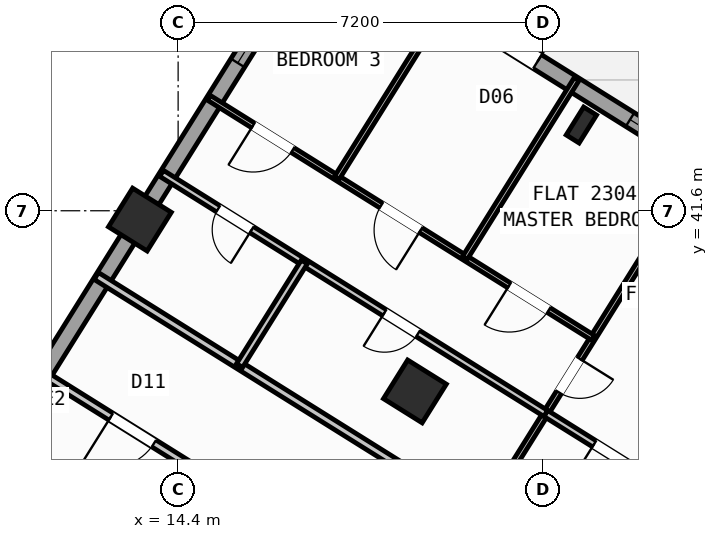
"""IFC4 building model, lengths in metres.
Left out: names, types, materials, properties, quantities, classifications, styles, units other than length and angle.
Written with IfcOpenShell. Run it as: python <this file> out.ifc"""

import sys

from ifc_helpers import new_model, si_unit, direction, frame, frame_2d, origin, origin_2d, place, context, subcontext, project, spatial, rectangle, hollow_rectangle, i_section, extrude, source, transform, mapped, element, fill, save


model = new_model("IFC4")
c1 = context("Model", 3, precision=1e-05, world=origin(), true_north=direction((0.0, 1.0)))
c2 = subcontext(c1, "Body", "Model", "MODEL_VIEW")
j1 = project(units=[si_unit("LENGTHUNIT", "METRE"), si_unit("PLANEANGLEUNIT", "RADIAN")], contexts=[c1])
p1 = place(None, origin())
s1 = spatial("IfcSite", under=j1, at=p1, CompositionType="ELEMENT")
p2 = place(p1, origin())
s2 = spatial("IfcBuilding", under=s1, at=p2, CompositionType="ELEMENT")
p3 = place(p2, frame((0.0, 0.0, 93.6)))
s3 = spatial("IfcBuildingStorey", under=s2, at=p3, CompositionType="ELEMENT", Elevation=93.6)
m1 = source(origin(), c2, "Body", "SweptSolid", [
    extrude(i_section(OverallWidth=0.3, OverallDepth=0.65, WebThickness=0.016, FlangeThickness=0.031, at=origin_2d()), origin(), (0.0, 0.0, 1.0), 3.6),
])
p4 = place(p3, frame((22.358, 43.292, 0.0), z_axis=(0.0, 0.0, 1.0), x_axis=(-0.848048096156, 0.529919264233, 0.0)))
e1 = element("IfcColumn", 1, at=p4, inside=s3, PredefinedType="COLUMN", context=c2, shape_type="MappedRepresentation", body=[
    mapped(m1, transform((0.0, 0.0, 0.0), scale=1.0)),
])
m2 = source(origin(), c2, "Body", "SweptSolid", [
    extrude(hollow_rectangle(XDim=0.9, YDim=0.9, WallThickness=0.036, at=origin_2d()), origin(), (0.0, 0.0, 1.0), 3.6),
])
for number, where, z_axis, x_axis in (
    (2, (19.073, 38.034, 0.0), (0.0, 0.0, 1.0), (-0.848, 0.53, 0.0)),
    (3, (13.646, 41.426, 0.0), (0.0, 0.0, 1.0), (-0.848, 0.53, 0.0)),
):
    element("IfcColumn", number, at=place(p3, frame(where, z_axis=z_axis, x_axis=x_axis)), inside=s3, PredefinedType="COLUMN", context=c2, shape_type="MappedRepresentation", body=[
        mapped(m2, transform((0.0, 0.0, 0.0), scale=1.0)),
    ])
p5 = place(p3, frame((5.7, 28.71, 0.0), z_axis=(0.0, 0.0, 1.0), x_axis=(0.529923711467, 0.8480453172, 0.0)))
e4 = element("IfcWall", 4, at=p5, inside=s3, PredefinedType="STANDARD", context=c2, shape_type="SweptSolid", body=[
    extrude(rectangle(XDim=21.587, YDim=0.32, at=frame_2d((10.794, 0.0))), origin(), (0.0, 0.0, 1.0), 2.775),
])
p6 = place(p5, frame((2.994, 0.0, 0.8)))
e5 = element("IfcOpeningElement", 5, at=p6, cuts=e4, PredefinedType="OPENING", context=c2, shape_type="SweptSolid", body=[
    extrude(rectangle(XDim=2.1, YDim=1.55, at=frame_2d((1.05, 0.775))), frame((0.0, 0.17, 0.0), z_axis=(0.0, -1.0, 0.0), x_axis=(1.0, 0.0, 0.0)), (0.0, 0.0, 1.0), 0.34),
])
p7 = place(p5, frame((9.739, 0.0, 1.0)))
e6 = element("IfcOpeningElement", 6, at=p7, cuts=e4, PredefinedType="OPENING", context=c2, shape_type="SweptSolid", body=[
    extrude(rectangle(XDim=0.9, YDim=1.25, at=frame_2d((0.45, 0.625))), frame((0.0, 0.17, 0.0), z_axis=(0.0, -1.0, 0.0), x_axis=(1.0, 0.0, 0.0)), (0.0, 0.0, 1.0), 0.34),
])
p8 = place(p5, frame((18.639, 0.0, 0.85)))
e7 = element("IfcOpeningElement", 7, at=p8, cuts=e4, PredefinedType="OPENING", context=c2, shape_type="SweptSolid", body=[
    extrude(rectangle(XDim=1.5, YDim=1.5, at=frame_2d((0.75, 0.75))), frame((0.0, 0.17, 0.0), z_axis=(0.0, -1.0, 0.0), x_axis=(1.0, 0.0, 0.0)), (0.0, 0.0, 1.0), 0.34),
])
p9 = place(p3, frame((17.424, 47.083, 0.0), z_axis=(0.0, 0.0, 1.0), x_axis=(0.848049927979, -0.529916332693, 0.0)))
e8 = element("IfcWall", 8, at=p9, inside=s3, PredefinedType="STANDARD", context=c2, shape_type="SweptSolid", body=[
    extrude(rectangle(XDim=29.223, YDim=0.32, at=frame_2d((14.612, 0.0))), origin(), (0.0, 0.0, 1.0), 3.35),
])
p10 = place(p9, frame((3.745, 0.0, 0.0)))
e9 = element("IfcOpeningElement", 9, at=p10, cuts=e8, PredefinedType="OPENING", context=c2, shape_type="SweptSolid", body=[
    extrude(rectangle(XDim=1.05, YDim=2.15, at=frame_2d((0.525, 1.075))), frame((0.0, 0.17, 0.0), z_axis=(0.0, -1.0, 0.0), x_axis=(1.0, 0.0, 0.0)), (0.0, 0.0, 1.0), 0.34),
])
p11 = place(p9, frame((0.699, 0.0, 0.95)))
e10 = element("IfcOpeningElement", 10, at=p11, cuts=e8, PredefinedType="OPENING", context=c2, shape_type="SweptSolid", body=[
    extrude(rectangle(XDim=1.2, YDim=1.4, at=frame_2d((0.6, 0.7))), frame((0.0, 0.17, 0.0), z_axis=(0.0, -1.0, 0.0), x_axis=(1.0, 0.0, 0.0)), (0.0, 0.0, 1.0), 0.34),
])
p12 = place(p9, frame((6.951, 0.0, 1.0)))
e11 = element("IfcOpeningElement", 11, at=p12, cuts=e8, PredefinedType="OPENING", context=c2, shape_type="SweptSolid", body=[
    extrude(rectangle(XDim=0.9, YDim=1.25, at=frame_2d((0.45, 0.625))), frame((0.0, 0.17, 0.0), z_axis=(0.0, -1.0, 0.0), x_axis=(1.0, 0.0, 0.0)), (0.0, 0.0, 1.0), 0.34),
])
p13 = place(p9, frame((9.841, 0.0, 0.85)))
e12 = element("IfcOpeningElement", 12, at=p13, cuts=e8, PredefinedType="OPENING", context=c2, shape_type="SweptSolid", body=[
    extrude(rectangle(XDim=1.5, YDim=1.5, at=frame_2d((0.75, 0.75))), frame((0.0, 0.17, 0.0), z_axis=(0.0, -1.0, 0.0), x_axis=(1.0, 0.0, 0.0)), (0.0, 0.0, 1.0), 0.34),
])
p14 = place(p9, frame((13.889, 0.0, 0.95)))
e13 = element("IfcOpeningElement", 13, at=p14, cuts=e8, PredefinedType="OPENING", context=c2, shape_type="SweptSolid", body=[
    extrude(rectangle(XDim=1.2, YDim=1.4, at=frame_2d((0.6, 0.7))), frame((0.0, 0.17, 0.0), z_axis=(0.0, -1.0, 0.0), x_axis=(1.0, 0.0, 0.0)), (0.0, 0.0, 1.0), 0.34),
])
p15 = place(p9, frame((17.254, 0.0, 1.0)))
e14 = element("IfcOpeningElement", 14, at=p15, cuts=e8, PredefinedType="OPENING", context=c2, shape_type="SweptSolid", body=[
    extrude(rectangle(XDim=0.9, YDim=1.25, at=frame_2d((0.45, 0.625))), frame((0.0, 0.17, 0.0), z_axis=(0.0, -1.0, 0.0), x_axis=(1.0, 0.0, 0.0)), (0.0, 0.0, 1.0), 0.34),
])
p16 = place(p9, frame((20.764, 0.0, 0.8)))
e15 = element("IfcOpeningElement", 15, at=p16, cuts=e8, PredefinedType="OPENING", context=c2, shape_type="SweptSolid", body=[
    extrude(rectangle(XDim=2.1, YDim=1.55, at=frame_2d((1.05, 0.775))), frame((0.0, 0.17, 0.0), z_axis=(0.0, -1.0, 0.0), x_axis=(1.0, 0.0, 0.0)), (0.0, 0.0, 1.0), 0.34),
])
p17 = place(p9, frame((25.403, 0.0, 0.8)))
e16 = element("IfcOpeningElement", 16, at=p17, cuts=e8, PredefinedType="OPENING", context=c2, shape_type="SweptSolid", body=[
    extrude(rectangle(XDim=2.1, YDim=1.55, at=frame_2d((1.05, 0.775))), frame((0.0, 0.17, 0.0), z_axis=(0.0, -1.0, 0.0), x_axis=(1.0, 0.0, 0.0)), (0.0, 0.0, 1.0), 0.34),
])
p18 = place(p3, frame((26.973, 31.447, 0.0), z_axis=(0.0, 0.0, 1.0), x_axis=(-0.848048310262, 0.529918921593, 0.0)))
e17 = element("IfcWall", 17, at=p18, inside=s3, PredefinedType="PARTITIONING", context=c2, shape_type="SweptSolid", body=[
    extrude(rectangle(XDim=16.73, YDim=0.16, at=frame_2d((8.365, 0.0))), origin(), (0.0, 0.0, 1.0), 3.34),
])
p19 = place(p18, frame((2.22, 0.0, 0.0)))
e18 = element("IfcOpeningElement", 18, at=p19, cuts=e17, PredefinedType="OPENING", context=c2, shape_type="SweptSolid", body=[
    extrude(rectangle(XDim=0.86, YDim=2.05, at=frame_2d((0.43, 1.025))), frame((0.0, 0.09, 0.0), z_axis=(0.0, -1.0, 0.0), x_axis=(1.0, 0.0, 0.0)), (0.0, 0.0, 1.0), 0.18),
])
p20 = place(p18, frame((5.28, 0.0, 0.0)))
e19 = element("IfcOpeningElement", 19, at=p20, cuts=e17, PredefinedType="OPENING", context=c2, shape_type="SweptSolid", body=[
    extrude(rectangle(XDim=1.0, YDim=2.1, at=frame_2d((0.5, 1.05))), frame((0.0, 0.09, 0.0), z_axis=(0.0, -1.0, 0.0), x_axis=(1.0, 0.0, 0.0)), (0.0, 0.0, 1.0), 0.18),
])
p21 = place(p3, frame((25.807, 29.582, 0.0), z_axis=(0.0, 0.0, 1.0), x_axis=(-0.848052408131, 0.529912363569, 0.0)))
e20 = element("IfcWall", 20, at=p21, inside=s3, PredefinedType="PARTITIONING", context=c2, shape_type="SweptSolid", body=[
    extrude(rectangle(XDim=16.73, YDim=0.16, at=frame_2d((8.365, 0.0))), origin(), (0.0, 0.0, 1.0), 3.34),
])
p22 = place(p21, frame((2.22, 0.0, 0.0)))
e21 = element("IfcOpeningElement", 21, at=p22, cuts=e20, PredefinedType="OPENING", context=c2, shape_type="SweptSolid", body=[
    extrude(rectangle(XDim=0.86, YDim=2.05, at=frame_2d((0.43, 1.025))), frame((0.0, 0.09, 0.0), z_axis=(0.0, -1.0, 0.0), x_axis=(1.0, 0.0, 0.0)), (0.0, 0.0, 1.0), 0.18),
])
p23 = place(p21, frame((14.013, 0.0, 0.0)))
e22 = element("IfcOpeningElement", 22, at=p23, cuts=e20, PredefinedType="OPENING", context=c2, shape_type="SweptSolid", body=[
    extrude(rectangle(XDim=1.0, YDim=2.1, at=frame_2d((0.5, 1.05))), frame((0.0, 0.09, 0.0), z_axis=(0.0, -1.0, 0.0), x_axis=(1.0, 0.0, 0.0)), (0.0, 0.0, 1.0), 0.18),
])
p24 = place(p3, frame((24.792, 42.62, 0.0), z_axis=(0.0, 0.0, 1.0), x_axis=(-0.529925083182, -0.848044460046, 0.0)))
e23 = element("IfcWall", 23, at=p24, inside=s3, PredefinedType="PARTITIONING", context=c2, shape_type="SweptSolid", body=[
    extrude(rectangle(XDim=8.32, YDim=0.11, at=frame_2d((4.16, 0.0))), origin(), (0.0, 0.0, 1.0), 3.34),
])
p25 = place(p24, frame((4.65, 0.0, 0.0)))
e24 = element("IfcOpeningElement", 24, at=p25, cuts=e23, PredefinedType="OPENING", context=c2, shape_type="SweptSolid", body=[
    extrude(rectangle(XDim=0.78, YDim=2.05, at=frame_2d((0.39, 1.025))), frame((0.0, 0.065, 0.0), z_axis=(0.0, -1.0, 0.0), x_axis=(1.0, 0.0, 0.0)), (0.0, 0.0, 1.0), 0.13),
])
p26 = place(p3, frame((25.03, 35.491, 0.0), z_axis=(0.0, 0.0, 1.0), x_axis=(-0.848070667369, 0.52988314103, 0.0)))
e25 = element("IfcWall", 25, at=p26, inside=s3, PredefinedType="PLUMBINGWALL", context=c2, shape_type="SweptSolid", body=[
    extrude(rectangle(XDim=3.98, YDim=0.14, at=frame_2d((1.99, 0.0))), origin(), (0.0, 0.0, 1.0), 3.34),
])
p27 = place(p26, frame((1.93, 0.0, 0.0)))
e26 = element("IfcOpeningElement", 26, at=p27, cuts=e25, PredefinedType="OPENING", context=c2, shape_type="SweptSolid", body=[
    extrude(rectangle(XDim=0.92, YDim=2.08, at=frame_2d((0.46, 1.04))), frame((0.0, 0.08, 0.0), z_axis=(0.0, -1.0, 0.0), x_axis=(1.0, 0.0, 0.0)), (0.0, 0.0, 1.0), 0.16),
])
p28 = place(p3, frame((21.655, 37.6, 0.0), z_axis=(0.0, 0.0, 1.0), x_axis=(-0.848044326704, 0.52992529657, 0.0)))
e27 = element("IfcWall", 27, at=p28, inside=s3, PredefinedType="PLUMBINGWALL", context=c2, shape_type="SweptSolid", body=[
    extrude(rectangle(XDim=8.94, YDim=0.14, at=frame_2d((4.47, 0.0))), origin(), (0.0, 0.0, 1.0), 3.34),
])
p29 = place(p28, frame((2.972, 0.0, 0.0)))
e28 = element("IfcOpeningElement", 28, at=p29, cuts=e27, PredefinedType="OPENING", context=c2, shape_type="SweptSolid", body=[
    extrude(rectangle(XDim=0.78, YDim=2.05, at=frame_2d((0.39, 1.025))), frame((0.0, 0.08, 0.0), z_axis=(0.0, -1.0, 0.0), x_axis=(1.0, 0.0, 0.0)), (0.0, 0.0, 1.0), 0.16),
])
p30 = place(p28, frame((6.843, 0.0, 0.0)))
e29 = element("IfcOpeningElement", 29, at=p30, cuts=e27, PredefinedType="OPENING", context=c2, shape_type="SweptSolid", body=[
    extrude(rectangle(XDim=0.78, YDim=2.05, at=frame_2d((0.39, 1.025))), frame((0.0, 0.08, 0.0), z_axis=(0.0, -1.0, 0.0), x_axis=(1.0, 0.0, 0.0)), (0.0, 0.0, 1.0), 0.16),
])
p31 = place(p3, frame((16.89, 40.589, 0.0), z_axis=(0.0, 0.0, 1.0), x_axis=(-0.52988967038, -0.848066587731, 0.0)))
e30 = element("IfcWall", 30, at=p31, inside=s3, PredefinedType="PLUMBINGWALL", context=c2, shape_type="SweptSolid", body=[
    extrude(rectangle(XDim=2.41, YDim=0.14, at=frame_2d((1.205, 0.0))), origin(), (0.0, 0.0, 1.0), 3.34),
])
p32 = place(p3, frame((22.588, 39.093, 0.0), z_axis=(0.0, 0.0, 1.0), x_axis=(-0.848044326704, 0.52992529657, 0.0)))
e31 = element("IfcWall", 31, at=p32, inside=s3, PredefinedType="PARTITIONING", context=c2, shape_type="SweptSolid", body=[
    extrude(rectangle(XDim=8.94, YDim=0.11, at=frame_2d((4.47, 0.0))), origin(), (0.0, 0.0, 1.0), 3.34),
])
p33 = place(p32, frame((1.03, 0.0, 0.0)))
e32 = element("IfcOpeningElement", 32, at=p33, cuts=e31, PredefinedType="OPENING", context=c2, shape_type="SweptSolid", body=[
    extrude(rectangle(XDim=0.92, YDim=2.08, at=frame_2d((0.46, 1.04))), frame((0.0, 0.065, 0.0), z_axis=(0.0, -1.0, 0.0), x_axis=(1.0, 0.0, 0.0)), (0.0, 0.0, 1.0), 0.13),
])
p34 = place(p32, frame((4.01, 0.0, 0.0)))
e33 = element("IfcOpeningElement", 33, at=p34, cuts=e31, PredefinedType="OPENING", context=c2, shape_type="SweptSolid", body=[
    extrude(rectangle(XDim=0.92, YDim=2.08, at=frame_2d((0.46, 1.04))), frame((0.0, 0.065, 0.0), z_axis=(0.0, -1.0, 0.0), x_axis=(1.0, 0.0, 0.0)), (0.0, 0.0, 1.0), 0.13),
])
p35 = place(p32, frame((6.99, 0.0, 0.0)))
e34 = element("IfcOpeningElement", 34, at=p35, cuts=e31, PredefinedType="OPENING", context=c2, shape_type="SweptSolid", body=[
    extrude(rectangle(XDim=0.92, YDim=2.08, at=frame_2d((0.46, 1.04))), frame((0.0, 0.065, 0.0), z_axis=(0.0, -1.0, 0.0), x_axis=(1.0, 0.0, 0.0)), (0.0, 0.0, 1.0), 0.13),
])
p36 = place(p3, frame((22.265, 44.199, 0.0), z_axis=(0.0, 0.0, 1.0), x_axis=(-0.529946186362, -0.848031272749, 0.0)))
e35 = element("IfcWall", 35, at=p36, inside=s3, PredefinedType="PARTITIONING", context=c2, shape_type="SweptSolid", body=[
    extrude(rectangle(XDim=4.16, YDim=0.11, at=frame_2d((2.08, 0.0))), origin(), (0.0, 0.0, 1.0), 3.34),
])
p37 = place(p3, frame((19.738, 45.779, 0.0), z_axis=(0.0, 0.0, 1.0), x_axis=(-0.529877605827, -0.848074125795, 0.0)))
e36 = element("IfcWall", 36, at=p37, inside=s3, PredefinedType="PARTITIONING", context=c2, shape_type="SweptSolid", body=[
    extrude(rectangle(XDim=4.16, YDim=0.11, at=frame_2d((2.08, 0.0))), origin(), (0.0, 0.0, 1.0), 3.34),
])
m3 = source(origin(), c2, "Body", "SweptSolid", [
    extrude(rectangle(XDim=1.05, YDim=2.15, at=frame_2d((0.525, 1.075))), frame((0.0, 0.025, 0.0), z_axis=(0.0, -1.0, 0.0), x_axis=(1.0, 0.0, 0.0)), (0.0, 0.0, 1.0), 0.05),
])
p38 = place(p10, origin())
e37 = element("IfcDoor", 37, at=p38, inside=s3, OperationType="SINGLE_SWING_RIGHT", PredefinedType="DOOR", context=c2, shape_type="MappedRepresentation", body=[
    mapped(m3, transform((0.0, 0.0, 0.0), scale=1.0)),
])
fill(e9, e37)
m4 = source(origin(), c2, "Body", "SweptSolid", [
    extrude(rectangle(XDim=1.5, YDim=1.5, at=frame_2d((0.75, 0.75))), frame((0.0, 0.03, 0.0), z_axis=(0.0, -1.0, 0.0), x_axis=(1.0, 0.0, 0.0)), (0.0, 0.0, 1.0), 0.06),
])
p39 = place(p8, origin())
e38 = element("IfcWindow", 38, at=p39, inside=s3, PartitioningType="SINGLE_PANEL", PredefinedType="WINDOW", context=c2, shape_type="MappedRepresentation", body=[
    mapped(m4, transform((0.0, 0.0, 0.0), scale=1.0)),
])
fill(e7, e38)
m5 = source(origin(), c2, "Body", "SweptSolid", [
    extrude(rectangle(XDim=0.9, YDim=1.25, at=frame_2d((0.45, 0.625))), frame((0.0, 0.03, 0.0), z_axis=(0.0, -1.0, 0.0), x_axis=(1.0, 0.0, 0.0)), (0.0, 0.0, 1.0), 0.06),
])
p40 = place(p12, origin())
e39 = element("IfcWindow", 39, at=p40, inside=s3, PartitioningType="SINGLE_PANEL", PredefinedType="WINDOW", context=c2, shape_type="MappedRepresentation", body=[
    mapped(m5, transform((0.0, 0.0, 0.0), scale=1.0)),
])
fill(e11, e39)
m6 = source(origin(), c2, "Body", "SweptSolid", [
    extrude(rectangle(XDim=1.0, YDim=2.1, at=frame_2d((0.5, 1.05))), frame((0.0, 0.025, 0.0), z_axis=(0.0, -1.0, 0.0), x_axis=(1.0, 0.0, 0.0)), (0.0, 0.0, 1.0), 0.05),
])
p41 = place(p23, origin())
e40 = element("IfcDoor", 40, at=p41, inside=s3, OperationType="SINGLE_SWING_RIGHT", PredefinedType="DOOR", context=c2, shape_type="MappedRepresentation", body=[
    mapped(m6, transform((0.0, 0.0, 0.0), scale=1.0)),
])
fill(e22, e40)
m7 = source(origin(), c2, "Body", "SweptSolid", [
    extrude(rectangle(XDim=0.92, YDim=2.08, at=frame_2d((0.46, 1.04))), frame((0.0, 0.025, 0.0), z_axis=(0.0, -1.0, 0.0), x_axis=(1.0, 0.0, 0.0)), (0.0, 0.0, 1.0), 0.05),
])
p42 = place(p27, origin())
e41 = element("IfcDoor", 41, at=p42, inside=s3, OperationType="SINGLE_SWING_RIGHT", PredefinedType="DOOR", context=c2, shape_type="MappedRepresentation", body=[
    mapped(m7, transform((0.0, 0.0, 0.0), scale=1.0)),
])
fill(e26, e41)
m8 = source(origin(), c2, "Body", "SweptSolid", [
    extrude(rectangle(XDim=0.78, YDim=2.05, at=frame_2d((0.39, 1.025))), frame((0.0, 0.025, 0.0), z_axis=(0.0, -1.0, 0.0), x_axis=(1.0, 0.0, 0.0)), (0.0, 0.0, 1.0), 0.05),
])
p43 = place(p25, origin())
e42 = element("IfcDoor", 42, at=p43, inside=s3, OperationType="SINGLE_SWING_LEFT", PredefinedType="DOOR", context=c2, shape_type="MappedRepresentation", body=[
    mapped(m8, transform((0.0, 0.0, 0.0), scale=1.0)),
])
fill(e24, e42)
p44 = place(p29, origin())
e43 = element("IfcDoor", 43, at=p44, inside=s3, OperationType="SINGLE_SWING_RIGHT", PredefinedType="DOOR", context=c2, shape_type="MappedRepresentation", body=[
    mapped(m8, transform((0.0, 0.0, 0.0), scale=1.0)),
])
fill(e28, e43)
p45 = place(p30, origin())
e44 = element("IfcDoor", 44, at=p45, inside=s3, OperationType="SINGLE_SWING_LEFT", PredefinedType="DOOR", context=c2, shape_type="MappedRepresentation", body=[
    mapped(m8, transform((0.0, 0.0, 0.0), scale=1.0)),
])
fill(e29, e44)
p46 = place(p33, origin())
e45 = element("IfcDoor", 45, at=p46, inside=s3, OperationType="SINGLE_SWING_RIGHT", PredefinedType="DOOR", context=c2, shape_type="MappedRepresentation", body=[
    mapped(m7, transform((0.0, 0.0, 0.0), scale=1.0)),
])
fill(e32, e45)
p47 = place(p34, origin())
e46 = element("IfcDoor", 46, at=p47, inside=s3, OperationType="SINGLE_SWING_LEFT", PredefinedType="DOOR", context=c2, shape_type="MappedRepresentation", body=[
    mapped(m7, transform((0.0, 0.0, 0.0), scale=1.0)),
])
fill(e33, e46)
p48 = place(p35, origin())
e47 = element("IfcDoor", 47, at=p48, inside=s3, OperationType="SINGLE_SWING_RIGHT", PredefinedType="DOOR", context=c2, shape_type="MappedRepresentation", body=[
    mapped(m7, transform((0.0, 0.0, 0.0), scale=1.0)),
])
fill(e34, e47)
save(model, sys.argv[1])
